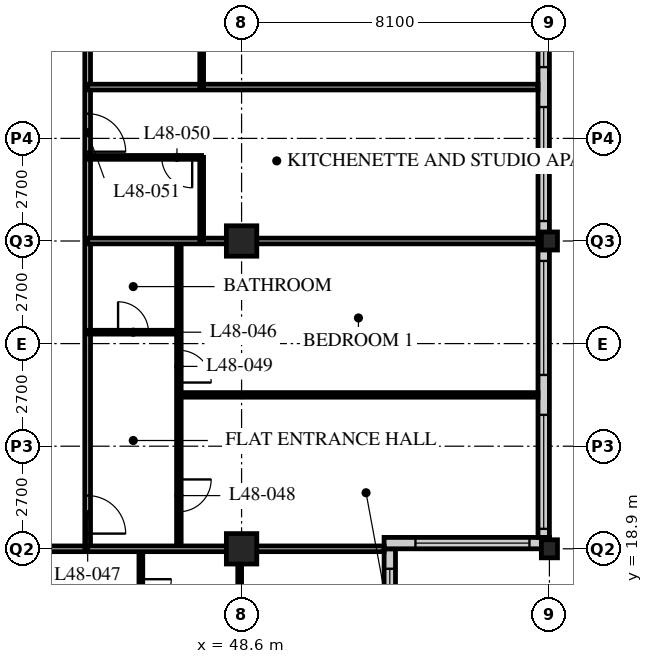
"""IFC4 building model, lengths in metres.
Left out: names, types, materials, properties, quantities, classifications, styles, units other than length and angle.
Written with IfcOpenShell. Run it as: python <this file> out.ifc"""

import sys

from ifc_helpers import new_model, si_unit, direction, frame, frame_2d, origin, origin_2d, place, context, subcontext, project, spatial, rectangle, hollow_rectangle, i_section, extrude, element, fill, save


model = new_model("IFC4")
c1 = context("Model", 3, precision=1e-05, world=origin(), true_north=direction((0.0, 1.0)))
c2 = subcontext(c1, "Body", "Model", "MODEL_VIEW")
j1 = project(units=[si_unit("LENGTHUNIT", "METRE"), si_unit("PLANEANGLEUNIT", "RADIAN")], contexts=[c1])
p1 = place(None, origin())
s1 = spatial("IfcSite", under=j1, at=p1, CompositionType="ELEMENT")
p2 = place(p1, origin())
s2 = spatial("IfcBuilding", under=s1, at=p2, CompositionType="ELEMENT")
p3 = place(p2, frame((0.0, 0.0, 188.4)))
s3 = spatial("IfcBuildingStorey", under=s2, at=p3, CompositionType="ELEMENT", Elevation=188.4)
for number, where, z_axis, x_axis in (
    (1, (48.6, 18.9, 0.0), (0.0, 0.0, 1.0), (1.0, 0.0, 0.0)),
    (2, (48.6, 27.0, 0.0), (0.0, 0.0, 1.0), (1.0, 0.0, 0.0)),
):
    element("IfcColumn", number, at=place(p3, frame(where, z_axis=z_axis, x_axis=x_axis)), inside=s3, PredefinedType="COLUMN", context=c2, shape_type="SweptSolid", body=[
        extrude(hollow_rectangle(XDim=0.8, YDim=0.8, WallThickness=0.08, at=origin_2d()), origin(), (0.0, 0.0, 1.0), 3.6),
    ])
for number, where, z_axis, x_axis in (
    (3, (56.7, 18.9, 0.0), (0.0, 0.0, 1.0), (1.0, 0.0, 0.0)),
    (4, (56.7, 27.0, 0.0), (0.0, 0.0, 1.0), (1.0, 0.0, 0.0)),
):
    element("IfcColumn", number, at=place(p3, frame(where, z_axis=z_axis, x_axis=x_axis)), inside=s3, PredefinedType="COLUMN", context=c2, shape_type="SweptSolid", body=[
        extrude(i_section(OverallWidth=0.424, OverallDepth=0.475, WebThickness=0.048, FlangeThickness=0.077, FilletRadius=0.015, at=origin_2d()), origin(), (0.0, 0.0, 1.0), 3.6),
    ])
p4 = place(p3, frame((52.5, 15.15, 0.0), z_axis=(0.0, 0.0, 1.0), x_axis=(0.0, 1.0, 0.0)))
e5 = element("IfcWall", 5, at=p4, inside=s3, PredefinedType="SOLIDWALL", context=c2, shape_type="SweptSolid", body=[
    extrude(rectangle(XDim=3.75, YDim=0.3, at=frame_2d((1.875, 0.0))), origin(), (0.0, 0.0, 1.0), 3.39),
])
p5 = place(p4, frame((0.225, 0.0, 0.6)))
e6 = element("IfcOpeningElement", 6, at=p5, cuts=e5, PredefinedType="OPENING", context=c2, shape_type="SweptSolid", body=[
    extrude(rectangle(XDim=3.0, YDim=2.0, at=frame_2d((1.5, 1.0))), frame((0.0, 0.16, 0.0), z_axis=(0.0, -1.0, 0.0), x_axis=(1.0, 0.0, 0.0)), (0.0, 0.0, 1.0), 0.32),
])
p6 = place(p3, frame((52.35, 19.05, 0.0), z_axis=(0.0, 0.0, 1.0), x_axis=(1.0, 0.0, 0.0)))
e7 = element("IfcWall", 7, at=p6, inside=s3, PredefinedType="SOLIDWALL", context=c2, shape_type="SweptSolid", body=[
    extrude(rectangle(XDim=4.35, YDim=0.3, at=frame_2d((2.175, 0.0))), origin(), (0.0, 0.0, 1.0), 3.39),
])
p7 = place(p6, frame((0.825, 0.0, 0.6)))
e8 = element("IfcOpeningElement", 8, at=p7, cuts=e7, PredefinedType="OPENING", context=c2, shape_type="SweptSolid", body=[
    extrude(rectangle(XDim=3.0, YDim=2.0, at=frame_2d((1.5, 1.0))), frame((0.0, 0.16, 0.0), z_axis=(0.0, -1.0, 0.0), x_axis=(1.0, 0.0, 0.0)), (0.0, 0.0, 1.0), 0.32),
])
p8 = place(p3, frame((56.55, 19.2, 0.0), z_axis=(0.0, 0.0, 1.0), x_axis=(0.0, 1.0, 0.0)))
e9 = element("IfcWall", 9, at=p8, inside=s3, PredefinedType="SOLIDWALL", context=c2, shape_type="SweptSolid", body=[
    extrude(rectangle(XDim=32.1, YDim=0.3, at=frame_2d((16.05, 0.0))), origin(), (0.0, 0.0, 1.0), 3.39),
])
p9 = place(p8, frame((0.225, 0.0, 0.6)))
e10 = element("IfcOpeningElement", 10, at=p9, cuts=e9, PredefinedType="OPENING", context=c2, shape_type="SweptSolid", body=[
    extrude(rectangle(XDim=3.0, YDim=2.4, at=frame_2d((1.5, 1.2))), frame((0.0, 0.16, 0.0), z_axis=(0.0, -1.0, 0.0), x_axis=(1.0, 0.0, 0.0)), (0.0, 0.0, 1.0), 0.32),
])
p10 = place(p8, frame((4.275, 0.0, 0.6)))
e11 = element("IfcOpeningElement", 11, at=p10, cuts=e9, PredefinedType="OPENING", context=c2, shape_type="SweptSolid", body=[
    extrude(rectangle(XDim=3.0, YDim=2.4, at=frame_2d((1.5, 1.2))), frame((0.0, 0.16, 0.0), z_axis=(0.0, -1.0, 0.0), x_axis=(1.0, 0.0, 0.0)), (0.0, 0.0, 1.0), 0.32),
])
p11 = place(p8, frame((8.325, 0.0, 0.6)))
e12 = element("IfcOpeningElement", 12, at=p11, cuts=e9, PredefinedType="OPENING", context=c2, shape_type="SweptSolid", body=[
    extrude(rectangle(XDim=3.0, YDim=2.4, at=frame_2d((1.5, 1.2))), frame((0.0, 0.16, 0.0), z_axis=(0.0, -1.0, 0.0), x_axis=(1.0, 0.0, 0.0)), (0.0, 0.0, 1.0), 0.32),
])
p12 = place(p8, frame((12.375, 0.0, 0.6)))
e13 = element("IfcOpeningElement", 13, at=p12, cuts=e9, PredefinedType="OPENING", context=c2, shape_type="SweptSolid", body=[
    extrude(rectangle(XDim=3.0, YDim=2.4, at=frame_2d((1.5, 1.2))), frame((0.0, 0.16, 0.0), z_axis=(0.0, -1.0, 0.0), x_axis=(1.0, 0.0, 0.0)), (0.0, 0.0, 1.0), 0.32),
])
p13 = place(p8, frame((16.425, 0.0, 0.6)))
e14 = element("IfcOpeningElement", 14, at=p13, cuts=e9, PredefinedType="OPENING", context=c2, shape_type="SweptSolid", body=[
    extrude(rectangle(XDim=3.0, YDim=2.4, at=frame_2d((1.5, 1.2))), frame((0.0, 0.16, 0.0), z_axis=(0.0, -1.0, 0.0), x_axis=(1.0, 0.0, 0.0)), (0.0, 0.0, 1.0), 0.32),
])
p14 = place(p8, frame((20.475, 0.0, 0.6)))
e15 = element("IfcOpeningElement", 15, at=p14, cuts=e9, PredefinedType="OPENING", context=c2, shape_type="SweptSolid", body=[
    extrude(rectangle(XDim=3.0, YDim=2.4, at=frame_2d((1.5, 1.2))), frame((0.0, 0.16, 0.0), z_axis=(0.0, -1.0, 0.0), x_axis=(1.0, 0.0, 0.0)), (0.0, 0.0, 1.0), 0.32),
])
p15 = place(p8, frame((24.525, 0.0, 0.6)))
e16 = element("IfcOpeningElement", 16, at=p15, cuts=e9, PredefinedType="OPENING", context=c2, shape_type="SweptSolid", body=[
    extrude(rectangle(XDim=3.0, YDim=2.4, at=frame_2d((1.5, 1.2))), frame((0.0, 0.16, 0.0), z_axis=(0.0, -1.0, 0.0), x_axis=(1.0, 0.0, 0.0)), (0.0, 0.0, 1.0), 0.32),
])
p16 = place(p8, frame((28.575, 0.0, 0.6)))
e17 = element("IfcOpeningElement", 17, at=p16, cuts=e9, PredefinedType="OPENING", context=c2, shape_type="SweptSolid", body=[
    extrude(rectangle(XDim=3.0, YDim=2.4, at=frame_2d((1.5, 1.2))), frame((0.0, 0.16, 0.0), z_axis=(0.0, -1.0, 0.0), x_axis=(1.0, 0.0, 0.0)), (0.0, 0.0, 1.0), 0.32),
])
p17 = place(p3, frame((12.15, 18.9, 0.0), z_axis=(0.0, 0.0, 1.0), x_axis=(1.0, 0.0, 0.0)))
e18 = element("IfcWall", 18, at=p17, inside=s3, PredefinedType="PARTITIONING", context=c2, shape_type="SweptSolid", body=[
    extrude(rectangle(XDim=32.4, YDim=0.15, at=frame_2d((16.2, 0.0))), origin(), (0.0, 0.0, 1.0), 2.778),
])
p18 = place(p17, frame((4.95, 0.0, 0.0)))
e19 = element("IfcOpeningElement", 19, at=p18, cuts=e18, PredefinedType="OPENING", context=c2, shape_type="SweptSolid", body=[
    extrude(rectangle(XDim=1.0, YDim=2.1, at=frame_2d((0.5, 1.05))), frame((0.0, 0.085, 0.0), z_axis=(0.0, -1.0, 0.0), x_axis=(1.0, 0.0, 0.0)), (0.0, 0.0, 1.0), 0.17),
])
p19 = place(p17, frame((13.05, 0.0, 0.0)))
e20 = element("IfcOpeningElement", 20, at=p19, cuts=e18, PredefinedType="OPENING", context=c2, shape_type="SweptSolid", body=[
    extrude(rectangle(XDim=1.0, YDim=2.1, at=frame_2d((0.5, 1.05))), frame((0.0, 0.085, 0.0), z_axis=(0.0, -1.0, 0.0), x_axis=(1.0, 0.0, 0.0)), (0.0, 0.0, 1.0), 0.17),
])
p20 = place(p17, frame((21.15, 0.0, 0.0)))
e21 = element("IfcOpeningElement", 21, at=p20, cuts=e18, PredefinedType="OPENING", context=c2, shape_type="SweptSolid", body=[
    extrude(rectangle(XDim=1.0, YDim=2.1, at=frame_2d((0.5, 1.05))), frame((0.0, 0.085, 0.0), z_axis=(0.0, -1.0, 0.0), x_axis=(1.0, 0.0, 0.0)), (0.0, 0.0, 1.0), 0.17),
])
p21 = place(p17, frame((1.525, 0.0, 0.0)))
e22 = element("IfcOpeningElement", 22, at=p21, cuts=e18, PredefinedType="OPENING", context=c2, shape_type="SweptSolid", body=[
    extrude(rectangle(XDim=1.0, YDim=2.1, at=frame_2d((0.5, 1.05))), frame((0.0, 0.085, 0.0), z_axis=(0.0, -1.0, 0.0), x_axis=(1.0, 0.0, 0.0)), (0.0, 0.0, 1.0), 0.17),
])
p22 = place(p17, frame((29.875, 0.0, 0.0)))
e23 = element("IfcOpeningElement", 23, at=p22, cuts=e18, PredefinedType="OPENING", context=c2, shape_type="SweptSolid", body=[
    extrude(rectangle(XDim=1.0, YDim=2.1, at=frame_2d((0.5, 1.05))), frame((0.0, 0.085, 0.0), z_axis=(0.0, -1.0, 0.0), x_axis=(1.0, 0.0, 0.0)), (0.0, 0.0, 1.0), 0.17),
])
p23 = place(p3, frame((44.55, 18.9, 0.0), z_axis=(0.0, 0.0, 1.0), x_axis=(0.0, 1.0, 0.0)))
e24 = element("IfcWall", 24, at=p23, inside=s3, PredefinedType="PARTITIONING", context=c2, shape_type="SweptSolid", body=[
    extrude(rectangle(XDim=28.35, YDim=0.15, at=frame_2d((14.175, 0.0))), origin(), (0.0, 0.0, 1.0), 3.39),
])
p24 = place(p23, frame((0.4, 0.0, 0.0)))
e25 = element("IfcOpeningElement", 25, at=p24, cuts=e24, PredefinedType="OPENING", context=c2, shape_type="SweptSolid", body=[
    extrude(rectangle(XDim=1.0, YDim=2.1, at=frame_2d((0.5, 1.05))), frame((0.0, 0.085, 0.0), z_axis=(0.0, -1.0, 0.0), x_axis=(1.0, 0.0, 0.0)), (0.0, 0.0, 1.0), 0.17),
])
p25 = place(p23, frame((10.45, 0.0, 0.0)))
e26 = element("IfcOpeningElement", 26, at=p25, cuts=e24, PredefinedType="OPENING", context=c2, shape_type="SweptSolid", body=[
    extrude(rectangle(XDim=1.0, YDim=2.1, at=frame_2d((0.5, 1.05))), frame((0.0, 0.085, 0.0), z_axis=(0.0, -1.0, 0.0), x_axis=(1.0, 0.0, 0.0)), (0.0, 0.0, 1.0), 0.17),
])
p26 = place(p23, frame((14.5, 0.0, 0.0)))
e27 = element("IfcOpeningElement", 27, at=p26, cuts=e24, PredefinedType="OPENING", context=c2, shape_type="SweptSolid", body=[
    extrude(rectangle(XDim=1.0, YDim=2.1, at=frame_2d((0.5, 1.05))), frame((0.0, 0.085, 0.0), z_axis=(0.0, -1.0, 0.0), x_axis=(1.0, 0.0, 0.0)), (0.0, 0.0, 1.0), 0.17),
])
p27 = place(p23, frame((16.6, 0.0, 0.0)))
e28 = element("IfcOpeningElement", 28, at=p27, cuts=e24, PredefinedType="OPENING", context=c2, shape_type="SweptSolid", body=[
    extrude(rectangle(XDim=1.0, YDim=2.1, at=frame_2d((0.5, 1.05))), frame((0.0, 0.085, 0.0), z_axis=(0.0, -1.0, 0.0), x_axis=(1.0, 0.0, 0.0)), (0.0, 0.0, 1.0), 0.17),
])
p28 = place(p23, frame((26.65, 0.0, 0.0)))
e29 = element("IfcOpeningElement", 29, at=p28, cuts=e24, PredefinedType="OPENING", context=c2, shape_type="SweptSolid", body=[
    extrude(rectangle(XDim=1.0, YDim=2.1, at=frame_2d((0.5, 1.05))), frame((0.0, 0.085, 0.0), z_axis=(0.0, -1.0, 0.0), x_axis=(1.0, 0.0, 0.0)), (0.0, 0.0, 1.0), 0.17),
])
p29 = place(p3, frame((46.95, 18.9, 0.0), z_axis=(0.0, 0.0, 1.0), x_axis=(0.0, 1.0, 0.0)))
e30 = element("IfcWall", 30, at=p29, inside=s3, PredefinedType="PARTITIONING", context=c2, shape_type="SweptSolid", body=[
    extrude(rectangle(XDim=8.1, YDim=0.12, at=frame_2d((4.05, 0.0))), origin(), (0.0, 0.0, 1.0), 3.39),
])
p30 = place(p29, frame((0.975, 0.0, 0.0)))
e31 = element("IfcOpeningElement", 31, at=p30, cuts=e30, PredefinedType="OPENING", context=c2, shape_type="SweptSolid", body=[
    extrude(rectangle(XDim=0.85, YDim=2.1, at=frame_2d((0.425, 1.05))), frame((0.0, 0.07, 0.0), z_axis=(0.0, -1.0, 0.0), x_axis=(1.0, 0.0, 0.0)), (0.0, 0.0, 1.0), 0.14),
])
p31 = place(p29, frame((4.375, 0.0, 0.0)))
e32 = element("IfcOpeningElement", 32, at=p31, cuts=e30, PredefinedType="OPENING", context=c2, shape_type="SweptSolid", body=[
    extrude(rectangle(XDim=0.85, YDim=2.1, at=frame_2d((0.425, 1.05))), frame((0.0, 0.07, 0.0), z_axis=(0.0, -1.0, 0.0), x_axis=(1.0, 0.0, 0.0)), (0.0, 0.0, 1.0), 0.14),
])
p32 = place(p3, frame((44.55, 24.6, 0.0), z_axis=(0.0, 0.0, 1.0), x_axis=(1.0, 0.0, 0.0)))
e33 = element("IfcWall", 33, at=p32, inside=s3, PredefinedType="PARTITIONING", context=c2, shape_type="SweptSolid", body=[
    extrude(rectangle(XDim=2.4, YDim=0.1, at=frame_2d((1.2, 0.0))), origin(), (0.0, 0.0, 1.0), 3.39),
])
p33 = place(p32, frame((0.8, 0.0, 0.0)))
e34 = element("IfcOpeningElement", 34, at=p33, cuts=e33, PredefinedType="OPENING", context=c2, shape_type="SweptSolid", body=[
    extrude(rectangle(XDim=0.8, YDim=2.1, at=frame_2d((0.4, 1.05))), frame((0.0, 0.06, 0.0), z_axis=(0.0, -1.0, 0.0), x_axis=(1.0, 0.0, 0.0)), (0.0, 0.0, 1.0), 0.12),
])
p34 = place(p3, frame((46.95, 22.95, 0.0), z_axis=(0.0, 0.0, 1.0), x_axis=(1.0, 0.0, 0.0)))
e35 = element("IfcWall", 35, at=p34, inside=s3, PredefinedType="PARTITIONING", context=c2, shape_type="SweptSolid", body=[
    extrude(rectangle(XDim=9.45, YDim=0.12, at=frame_2d((4.725, 0.0))), origin(), (0.0, 0.0, 1.0), 3.39),
])
p35 = place(p3, frame((44.55, 27.0, 0.0), z_axis=(0.0, 0.0, 1.0), x_axis=(1.0, 0.0, 0.0)))
e36 = element("IfcWall", 36, at=p35, inside=s3, PredefinedType="PARTITIONING", context=c2, shape_type="SweptSolid", body=[
    extrude(rectangle(XDim=11.85, YDim=0.15, at=frame_2d((5.925, 0.0))), origin(), (0.0, 0.0, 1.0), 2.778),
])
p36 = place(p3, frame((47.55, 27.0, 0.0), z_axis=(0.0, 0.0, 1.0), x_axis=(0.0, 1.0, 0.0)))
e37 = element("IfcWall", 37, at=p36, inside=s3, PredefinedType="PARTITIONING", context=c2, shape_type="SweptSolid", body=[
    extrude(rectangle(XDim=2.2, YDim=0.1, at=frame_2d((1.1, 0.0))), origin(), (0.0, 0.0, 1.0), 3.39),
])
p37 = place(p3, frame((44.55, 29.2, 0.0), z_axis=(0.0, 0.0, 1.0), x_axis=(1.0, 0.0, 0.0)))
e38 = element("IfcWall", 38, at=p37, inside=s3, PredefinedType="PARTITIONING", context=c2, shape_type="SweptSolid", body=[
    extrude(rectangle(XDim=3.0, YDim=0.1, at=frame_2d((1.5, 0.0))), origin(), (0.0, 0.0, 1.0), 3.39),
])
p38 = place(p37, frame((1.95, 0.0, 0.0)))
e39 = element("IfcOpeningElement", 39, at=p38, cuts=e38, PredefinedType="OPENING", context=c2, shape_type="SweptSolid", body=[
    extrude(rectangle(XDim=0.8, YDim=2.1, at=frame_2d((0.4, 1.05))), frame((0.0, 0.06, 0.0), z_axis=(0.0, -1.0, 0.0), x_axis=(1.0, 0.0, 0.0)), (0.0, 0.0, 1.0), 0.12),
])
p39 = place(p3, frame((44.55, 31.05, 0.0), z_axis=(0.0, 0.0, 1.0), x_axis=(1.0, 0.0, 0.0)))
e40 = element("IfcWall", 40, at=p39, inside=s3, PredefinedType="PARTITIONING", context=c2, shape_type="SweptSolid", body=[
    extrude(rectangle(XDim=11.85, YDim=0.15, at=frame_2d((5.925, 0.0))), origin(), (0.0, 0.0, 1.0), 3.39),
])
p40 = place(p3, frame((47.55, 31.05, 0.0), z_axis=(0.0, 0.0, 1.0), x_axis=(0.0, 1.0, 0.0)))
e41 = element("IfcWall", 41, at=p40, inside=s3, PredefinedType="PARTITIONING", context=c2, shape_type="SweptSolid", body=[
    extrude(rectangle(XDim=2.2, YDim=0.1, at=frame_2d((1.1, 0.0))), origin(), (0.0, 0.0, 1.0), 3.39),
])
p41 = place(p3, frame((45.95, 18.9, 0.0), z_axis=(0.0, 0.0, 1.0), x_axis=(0.0, -1.0, 0.0)))
e42 = element("IfcWall", 42, at=p41, inside=s3, PredefinedType="PARTITIONING", context=c2, shape_type="SweptSolid", body=[
    extrude(rectangle(XDim=2.4, YDim=0.1, at=frame_2d((1.2, 0.0))), origin(), (0.0, 0.0, 1.0), 3.39),
])
p42 = place(p41, frame((0.8, 0.0, 0.0)))
e43 = element("IfcOpeningElement", 43, at=p42, cuts=e42, PredefinedType="OPENING", context=c2, shape_type="SweptSolid", body=[
    extrude(rectangle(XDim=0.8, YDim=2.1, at=frame_2d((0.4, 1.05))), frame((0.0, 0.06, 0.0), z_axis=(0.0, -1.0, 0.0), x_axis=(1.0, 0.0, 0.0)), (0.0, 0.0, 1.0), 0.12),
])
p43 = place(p3, frame((48.55, 18.9, 0.0), z_axis=(0.0, 0.0, 1.0), x_axis=(0.0, -1.0, 0.0)))
e44 = element("IfcWall", 44, at=p43, inside=s3, PredefinedType="PARTITIONING", context=c2, shape_type="SweptSolid", body=[
    extrude(rectangle(XDim=2.4, YDim=0.1, at=frame_2d((1.2, 0.0))), origin(), (0.0, 0.0, 1.0), 2.778),
])
p44 = place(p3, frame((44.55, 18.9, 0.0), z_axis=(0.0, 0.0, 1.0), x_axis=(1.0, 0.0, 0.0)))
e45 = element("IfcWall", 45, at=p44, inside=s3, PredefinedType="PARTITIONING", context=c2, shape_type="SweptSolid", body=[
    extrude(rectangle(XDim=7.8, YDim=0.15, at=frame_2d((3.9, 0.0))), origin(), (0.0, 0.0, 1.0), 2.778),
])
p45 = place(p5, origin())
e46 = element("IfcWindow", 46, at=p45, inside=s3, PartitioningType="SINGLE_PANEL", PredefinedType="WINDOW", context=c2, shape_type="SweptSolid", body=[
    extrude(rectangle(XDim=3.0, YDim=2.0, at=frame_2d((1.5, 1.0))), frame((0.0, 0.03, 0.0), z_axis=(0.0, -1.0, 0.0), x_axis=(1.0, 0.0, 0.0)), (0.0, 0.0, 1.0), 0.06),
])
fill(e6, e46)
p46 = place(p7, origin())
e47 = element("IfcWindow", 47, at=p46, inside=s3, PartitioningType="SINGLE_PANEL", PredefinedType="WINDOW", context=c2, shape_type="SweptSolid", body=[
    extrude(rectangle(XDim=3.0, YDim=2.0, at=frame_2d((1.5, 1.0))), frame((0.0, 0.03, 0.0), z_axis=(0.0, -1.0, 0.0), x_axis=(1.0, 0.0, 0.0)), (0.0, 0.0, 1.0), 0.06),
])
fill(e8, e47)
p47 = place(p9, origin())
e48 = element("IfcWindow", 48, at=p47, inside=s3, PartitioningType="SINGLE_PANEL", PredefinedType="WINDOW", context=c2, shape_type="SweptSolid", body=[
    extrude(rectangle(XDim=3.0, YDim=2.4, at=frame_2d((1.5, 1.2))), frame((0.0, 0.03, 0.0), z_axis=(0.0, -1.0, 0.0), x_axis=(1.0, 0.0, 0.0)), (0.0, 0.0, 1.0), 0.06),
])
fill(e10, e48)
p48 = place(p10, origin())
e49 = element("IfcWindow", 49, at=p48, inside=s3, PartitioningType="SINGLE_PANEL", PredefinedType="WINDOW", context=c2, shape_type="SweptSolid", body=[
    extrude(rectangle(XDim=3.0, YDim=2.4, at=frame_2d((1.5, 1.2))), frame((0.0, 0.03, 0.0), z_axis=(0.0, -1.0, 0.0), x_axis=(1.0, 0.0, 0.0)), (0.0, 0.0, 1.0), 0.06),
])
fill(e11, e49)
p49 = place(p11, origin())
e50 = element("IfcWindow", 50, at=p49, inside=s3, PartitioningType="SINGLE_PANEL", PredefinedType="WINDOW", context=c2, shape_type="SweptSolid", body=[
    extrude(rectangle(XDim=3.0, YDim=2.4, at=frame_2d((1.5, 1.2))), frame((0.0, 0.03, 0.0), z_axis=(0.0, -1.0, 0.0), x_axis=(1.0, 0.0, 0.0)), (0.0, 0.0, 1.0), 0.06),
])
fill(e12, e50)
p50 = place(p12, origin())
e51 = element("IfcWindow", 51, at=p50, inside=s3, PartitioningType="SINGLE_PANEL", PredefinedType="WINDOW", context=c2, shape_type="SweptSolid", body=[
    extrude(rectangle(XDim=3.0, YDim=2.4, at=frame_2d((1.5, 1.2))), frame((0.0, 0.03, 0.0), z_axis=(0.0, -1.0, 0.0), x_axis=(1.0, 0.0, 0.0)), (0.0, 0.0, 1.0), 0.06),
])
fill(e13, e51)
p51 = place(p33, origin())
e52 = element("IfcDoor", 52, at=p51, inside=s3, OperationType="SINGLE_SWING_LEFT", PredefinedType="DOOR", context=c2, shape_type="SweptSolid", body=[
    extrude(rectangle(XDim=0.8, YDim=2.1, at=frame_2d((0.4, 1.05))), frame((0.0, 0.025, 0.0), z_axis=(0.0, -1.0, 0.0), x_axis=(1.0, 0.0, 0.0)), (0.0, 0.0, 1.0), 0.05),
])
fill(e34, e52)
p52 = place(p24, origin())
e53 = element("IfcDoor", 53, at=p52, inside=s3, OperationType="SINGLE_SWING_RIGHT", PredefinedType="DOOR", context=c2, shape_type="SweptSolid", body=[
    extrude(rectangle(XDim=1.0, YDim=2.1, at=frame_2d((0.5, 1.05))), frame((0.0, 0.025, 0.0), z_axis=(0.0, -1.0, 0.0), x_axis=(1.0, 0.0, 0.0)), (0.0, 0.0, 1.0), 0.05),
])
fill(e25, e53)
p53 = place(p30, origin())
e54 = element("IfcDoor", 54, at=p53, inside=s3, OperationType="SINGLE_SWING_LEFT", PredefinedType="DOOR", context=c2, shape_type="SweptSolid", body=[
    extrude(rectangle(XDim=0.85, YDim=2.1, at=frame_2d((0.425, 1.05))), frame((0.0, 0.025, 0.0), z_axis=(0.0, -1.0, 0.0), x_axis=(1.0, 0.0, 0.0)), (0.0, 0.0, 1.0), 0.05),
])
fill(e31, e54)
p54 = place(p31, origin())
e55 = element("IfcDoor", 55, at=p54, inside=s3, OperationType="SINGLE_SWING_RIGHT", PredefinedType="DOOR", context=c2, shape_type="SweptSolid", body=[
    extrude(rectangle(XDim=0.85, YDim=2.1, at=frame_2d((0.425, 1.05))), frame((0.0, 0.025, 0.0), z_axis=(0.0, -1.0, 0.0), x_axis=(1.0, 0.0, 0.0)), (0.0, 0.0, 1.0), 0.05),
])
fill(e32, e55)
p55 = place(p38, origin())
e56 = element("IfcDoor", 56, at=p55, inside=s3, OperationType="SINGLE_SWING_LEFT", PredefinedType="DOOR", context=c2, shape_type="SweptSolid", body=[
    extrude(rectangle(XDim=0.8, YDim=2.1, at=frame_2d((0.4, 1.05))), frame((0.0, 0.025, 0.0), z_axis=(0.0, -1.0, 0.0), x_axis=(1.0, 0.0, 0.0)), (0.0, 0.0, 1.0), 0.05),
])
fill(e39, e56)
p56 = place(p25, origin())
e57 = element("IfcDoor", 57, at=p56, inside=s3, OperationType="SINGLE_SWING_RIGHT", PredefinedType="DOOR", context=c2, shape_type="SweptSolid", body=[
    extrude(rectangle(XDim=1.0, YDim=2.1, at=frame_2d((0.5, 1.05))), frame((0.0, 0.025, 0.0), z_axis=(0.0, -1.0, 0.0), x_axis=(1.0, 0.0, 0.0)), (0.0, 0.0, 1.0), 0.05),
])
fill(e26, e57)
p57 = place(p42, origin())
e58 = element("IfcDoor", 58, at=p57, inside=s3, OperationType="SINGLE_SWING_LEFT", PredefinedType="DOOR", context=c2, shape_type="SweptSolid", body=[
    extrude(rectangle(XDim=0.8, YDim=2.1, at=frame_2d((0.4, 1.05))), frame((0.0, 0.025, 0.0), z_axis=(0.0, -1.0, 0.0), x_axis=(1.0, 0.0, 0.0)), (0.0, 0.0, 1.0), 0.05),
])
fill(e43, e58)
save(model, sys.argv[1])
